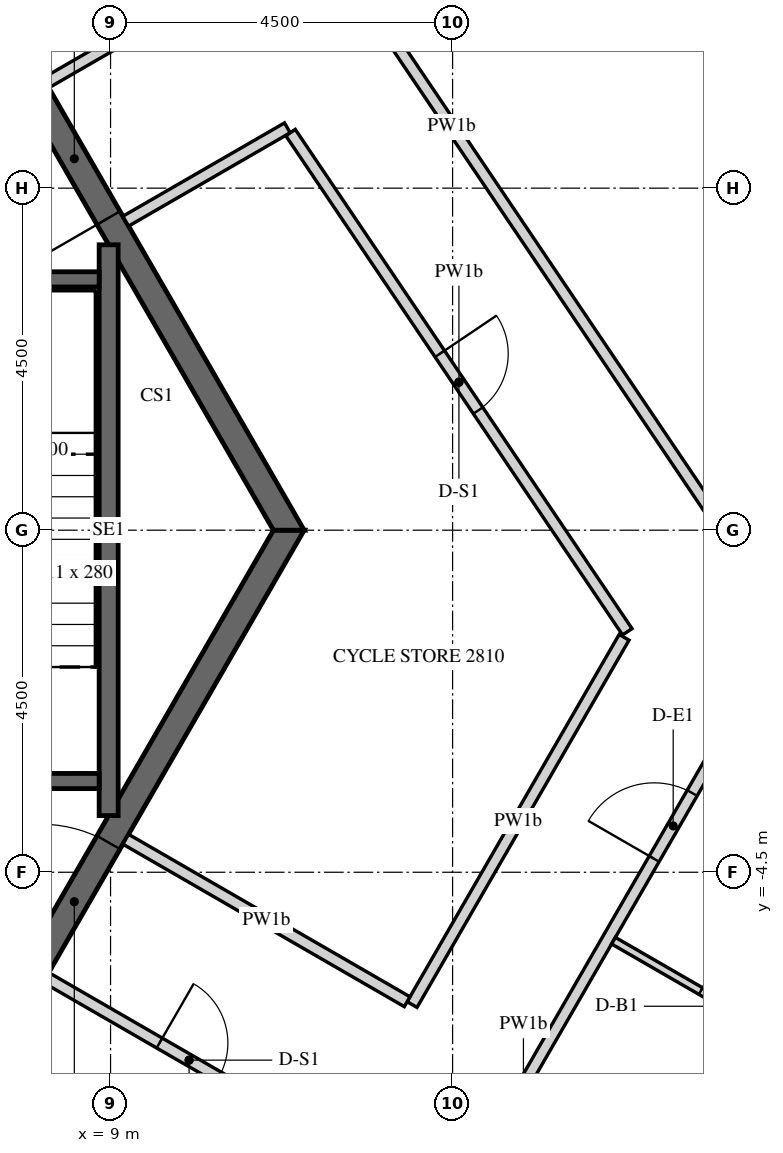
"""IFC4 building model, lengths in metres.
Left out: names, types, materials, properties, quantities, classifications, styles, units other than length and angle.
Written with IfcOpenShell. Run it as: python <this file> out.ifc"""

import sys

from ifc_helpers import new_model, si_unit, direction, frame, frame_2d, origin, place, context, subcontext, project, spatial, polyline, rectangle, outline, extrude, element, fill, save


model = new_model("IFC4")
c1 = context("Model", 3, precision=1e-05, world=origin(), true_north=direction((0.0, 1.0)))
c2 = subcontext(c1, "Body", "Model", "MODEL_VIEW")
j1 = project(units=[si_unit("LENGTHUNIT", "METRE"), si_unit("PLANEANGLEUNIT", "RADIAN")], contexts=[c1])
p1 = place(None, origin())
s1 = spatial("IfcSite", under=j1, at=p1, CompositionType="ELEMENT")
p2 = place(p1, origin())
s2 = spatial("IfcBuilding", under=s1, at=p2, CompositionType="ELEMENT")
p3 = place(p2, frame((0.0, 0.0, 361.2)))
s3 = spatial("IfcBuildingStorey", under=s2, at=p3, CompositionType="ELEMENT", Elevation=361.2)
p4 = place(p3, frame((15.273, -21.097, -0.15), z_axis=(0.0, 0.0, 1.0), x_axis=(0.499997453958, 0.866026873738, 0.0)))
e1 = element("IfcWall", 1, at=p4, inside=s3, PredefinedType="SOLIDWALL", context=c2, shape_type="SweptSolid", body=[
    extrude(outline(polyline([(-0.018, -0.225), (23.152, -0.225), (23.11, 0.225), (0.018, 0.225), (-0.018, -0.225)])), origin(), (0.0, 0.0, 1.0), 3.9),
])
p5 = place(p4, frame((1.366, 0.0, 0.45)))
e2 = element("IfcOpeningElement", 2, at=p5, cuts=e1, PredefinedType="OPENING", context=c2, shape_type="SweptSolid", body=[
    extrude(rectangle(XDim=2.4, YDim=3.0, at=frame_2d((1.2, 1.5))), frame((0.0, 0.235, 0.0), z_axis=(0.0, -1.0, 0.0), x_axis=(1.0, 0.0, 0.0)), (0.0, 0.0, 1.0), 0.47),
])
p6 = place(p4, frame((4.966, 0.0, 0.45)))
e3 = element("IfcOpeningElement", 3, at=p6, cuts=e1, PredefinedType="OPENING", context=c2, shape_type="SweptSolid", body=[
    extrude(rectangle(XDim=2.4, YDim=3.0, at=frame_2d((1.2, 1.5))), frame((0.0, 0.235, 0.0), z_axis=(0.0, -1.0, 0.0), x_axis=(1.0, 0.0, 0.0)), (0.0, 0.0, 1.0), 0.47),
])
p7 = place(p4, frame((8.566, 0.0, 0.45)))
e4 = element("IfcOpeningElement", 4, at=p7, cuts=e1, PredefinedType="OPENING", context=c2, shape_type="SweptSolid", body=[
    extrude(rectangle(XDim=2.4, YDim=3.0, at=frame_2d((1.2, 1.5))), frame((0.0, 0.235, 0.0), z_axis=(0.0, -1.0, 0.0), x_axis=(1.0, 0.0, 0.0)), (0.0, 0.0, 1.0), 0.47),
])
p8 = place(p4, frame((12.166, 0.0, 0.45)))
e5 = element("IfcOpeningElement", 5, at=p8, cuts=e1, PredefinedType="OPENING", context=c2, shape_type="SweptSolid", body=[
    extrude(rectangle(XDim=2.4, YDim=3.0, at=frame_2d((1.2, 1.5))), frame((0.0, 0.235, 0.0), z_axis=(0.0, -1.0, 0.0), x_axis=(1.0, 0.0, 0.0)), (0.0, 0.0, 1.0), 0.47),
])
p9 = place(p4, frame((15.766, 0.0, 0.45)))
e6 = element("IfcOpeningElement", 6, at=p9, cuts=e1, PredefinedType="OPENING", context=c2, shape_type="SweptSolid", body=[
    extrude(rectangle(XDim=2.4, YDim=3.0, at=frame_2d((1.2, 1.5))), frame((0.0, 0.235, 0.0), z_axis=(0.0, -1.0, 0.0), x_axis=(1.0, 0.0, 0.0)), (0.0, 0.0, 1.0), 0.47),
])
p10 = place(p4, frame((19.366, 0.0, 0.45)))
e7 = element("IfcOpeningElement", 7, at=p10, cuts=e1, PredefinedType="OPENING", context=c2, shape_type="SweptSolid", body=[
    extrude(rectangle(XDim=2.4, YDim=3.0, at=frame_2d((1.2, 1.5))), frame((0.0, 0.235, 0.0), z_axis=(0.0, -1.0, 0.0), x_axis=(1.0, 0.0, 0.0)), (0.0, 0.0, 1.0), 0.47),
])
p11 = place(p3, frame((24.37, 2.811, -0.15), z_axis=(0.0, 0.0, 1.0), x_axis=(-0.559187034749, 0.829041531027, 0.0)))
e8 = element("IfcWall", 8, at=p11, inside=s3, PredefinedType="SOLIDWALL", context=c2, shape_type="SweptSolid", body=[
    extrude(outline(polyline([(0.225, -0.225), (20.506, -0.225), (20.957, 0.225), (-0.225, 0.225), (0.225, -0.225)])), origin(), (0.0, 0.0, 1.0), 3.9),
])
p12 = place(p11, frame((0.325, 0.0, 1.05)))
e9 = element("IfcOpeningElement", 9, at=p12, cuts=e8, PredefinedType="OPENING", context=c2, shape_type="SweptSolid", body=[
    extrude(rectangle(XDim=0.9, YDim=1.5, at=frame_2d((0.45, 0.75))), frame((0.0, 0.235, 0.0), z_axis=(0.0, -1.0, 0.0), x_axis=(1.0, 0.0, 0.0)), (0.0, 0.0, 1.0), 0.47),
])
p13 = place(p11, frame((1.525, 0.0, 0.15)))
e10 = element("IfcOpeningElement", 10, at=p13, cuts=e8, PredefinedType="OPENING", context=c2, shape_type="SweptSolid", body=[
    extrude(rectangle(XDim=1.2, YDim=2.4, at=frame_2d((0.6, 1.2))), frame((0.0, 0.235, 0.0), z_axis=(0.0, -1.0, 0.0), x_axis=(1.0, 0.0, 0.0)), (0.0, 0.0, 1.0), 0.47),
])
p14 = place(p11, frame((3.766, 0.0, 1.05)))
e11 = element("IfcOpeningElement", 11, at=p14, cuts=e8, PredefinedType="OPENING", context=c2, shape_type="SweptSolid", body=[
    extrude(rectangle(XDim=0.9, YDim=1.5, at=frame_2d((0.45, 0.75))), frame((0.0, 0.235, 0.0), z_axis=(0.0, -1.0, 0.0), x_axis=(1.0, 0.0, 0.0)), (0.0, 0.0, 1.0), 0.47),
])
p15 = place(p11, frame((4.966, 0.0, 0.15)))
e12 = element("IfcOpeningElement", 12, at=p15, cuts=e8, PredefinedType="OPENING", context=c2, shape_type="SweptSolid", body=[
    extrude(rectangle(XDim=1.2, YDim=2.4, at=frame_2d((0.6, 1.2))), frame((0.0, 0.235, 0.0), z_axis=(0.0, -1.0, 0.0), x_axis=(1.0, 0.0, 0.0)), (0.0, 0.0, 1.0), 0.47),
])
p16 = place(p11, frame((7.366, 0.0, 1.05)))
e13 = element("IfcOpeningElement", 13, at=p16, cuts=e8, PredefinedType="OPENING", context=c2, shape_type="SweptSolid", body=[
    extrude(rectangle(XDim=0.9, YDim=1.5, at=frame_2d((0.45, 0.75))), frame((0.0, 0.235, 0.0), z_axis=(0.0, -1.0, 0.0), x_axis=(1.0, 0.0, 0.0)), (0.0, 0.0, 1.0), 0.47),
])
p17 = place(p11, frame((8.566, 0.0, 0.15)))
e14 = element("IfcOpeningElement", 14, at=p17, cuts=e8, PredefinedType="OPENING", context=c2, shape_type="SweptSolid", body=[
    extrude(rectangle(XDim=1.2, YDim=2.4, at=frame_2d((0.6, 1.2))), frame((0.0, 0.235, 0.0), z_axis=(0.0, -1.0, 0.0), x_axis=(1.0, 0.0, 0.0)), (0.0, 0.0, 1.0), 0.47),
])
p18 = place(p11, frame((10.966, 0.0, 1.05)))
e15 = element("IfcOpeningElement", 15, at=p18, cuts=e8, PredefinedType="OPENING", context=c2, shape_type="SweptSolid", body=[
    extrude(rectangle(XDim=0.9, YDim=1.5, at=frame_2d((0.45, 0.75))), frame((0.0, 0.235, 0.0), z_axis=(0.0, -1.0, 0.0), x_axis=(1.0, 0.0, 0.0)), (0.0, 0.0, 1.0), 0.47),
])
p19 = place(p11, frame((12.166, 0.0, 0.15)))
e16 = element("IfcOpeningElement", 16, at=p19, cuts=e8, PredefinedType="OPENING", context=c2, shape_type="SweptSolid", body=[
    extrude(rectangle(XDim=1.2, YDim=2.4, at=frame_2d((0.6, 1.2))), frame((0.0, 0.235, 0.0), z_axis=(0.0, -1.0, 0.0), x_axis=(1.0, 0.0, 0.0)), (0.0, 0.0, 1.0), 0.47),
])
p20 = place(p11, frame((14.566, 0.0, 1.05)))
e17 = element("IfcOpeningElement", 17, at=p20, cuts=e8, PredefinedType="OPENING", context=c2, shape_type="SweptSolid", body=[
    extrude(rectangle(XDim=0.9, YDim=1.5, at=frame_2d((0.45, 0.75))), frame((0.0, 0.235, 0.0), z_axis=(0.0, -1.0, 0.0), x_axis=(1.0, 0.0, 0.0)), (0.0, 0.0, 1.0), 0.47),
])
p21 = place(p11, frame((15.766, 0.0, 0.15)))
e18 = element("IfcOpeningElement", 18, at=p21, cuts=e8, PredefinedType="OPENING", context=c2, shape_type="SweptSolid", body=[
    extrude(rectangle(XDim=1.2, YDim=2.4, at=frame_2d((0.6, 1.2))), frame((0.0, 0.235, 0.0), z_axis=(0.0, -1.0, 0.0), x_axis=(1.0, 0.0, 0.0)), (0.0, 0.0, 1.0), 0.47),
])
p22 = place(p11, frame((18.007, 0.0, 1.05)))
e19 = element("IfcOpeningElement", 19, at=p22, cuts=e8, PredefinedType="OPENING", context=c2, shape_type="SweptSolid", body=[
    extrude(rectangle(XDim=0.9, YDim=1.5, at=frame_2d((0.45, 0.75))), frame((0.0, 0.235, 0.0), z_axis=(0.0, -1.0, 0.0), x_axis=(1.0, 0.0, 0.0)), (0.0, 0.0, 1.0), 0.47),
])
p23 = place(p11, frame((19.207, 0.0, 0.15)))
e20 = element("IfcOpeningElement", 20, at=p23, cuts=e8, PredefinedType="OPENING", context=c2, shape_type="SweptSolid", body=[
    extrude(rectangle(XDim=1.2, YDim=2.4, at=frame_2d((0.6, 1.2))), frame((0.0, 0.235, 0.0), z_axis=(0.0, -1.0, 0.0), x_axis=(1.0, 0.0, 0.0)), (0.0, 0.0, 1.0), 0.47),
])
p24 = place(p3, frame((5.673, -9.825, -0.15), z_axis=(0.0, 0.0, 1.0), x_axis=(0.499995046907, 0.866028263435, 0.0)))
e21 = element("IfcWall", 21, at=p24, inside=s3, PredefinedType="SHEAR", context=c2, shape_type="SweptSolid", body=[
    extrude(outline(polyline([(-0.101, -0.175), (11.446, -0.175), (11.244, 0.175), (0.101, 0.175), (-0.101, -0.175)])), origin(), (0.0, 0.0, 1.0), 3.9),
])
p25 = place(p24, frame((4.801, 0.0, 0.15)))
e22 = element("IfcOpeningElement", 22, at=p25, cuts=e21, PredefinedType="OPENING", context=c2, shape_type="SweptSolid", body=[
    extrude(rectangle(XDim=1.8, YDim=2.4, at=frame_2d((0.9, 1.2))), frame((0.0, 0.185, 0.0), z_axis=(0.0, -1.0, 0.0), x_axis=(1.0, 0.0, 0.0)), (0.0, 0.0, 1.0), 0.37),
])
p26 = place(p3, frame((11.345, 0.0, -0.15), z_axis=(0.0, 0.0, 1.0), x_axis=(-0.499995046907, 0.866028263435, 0.0)))
e23 = element("IfcWall", 23, at=p26, inside=s3, PredefinedType="SHEAR", context=c2, shape_type="SweptSolid", body=[
    extrude(outline(polyline([(-0.101, -0.175), (11.446, -0.175), (11.244, 0.175), (0.101, 0.175), (-0.101, -0.175)])), origin(), (0.0, 0.0, 1.0), 3.9),
])
p27 = place(p26, frame((4.744, 0.0, 0.15)))
e24 = element("IfcOpeningElement", 24, at=p27, cuts=e23, PredefinedType="OPENING", context=c2, shape_type="SweptSolid", body=[
    extrude(rectangle(XDim=1.8, YDim=2.4, at=frame_2d((0.9, 1.2))), frame((0.0, 0.185, 0.0), z_axis=(0.0, -1.0, 0.0), x_axis=(1.0, 0.0, 0.0)), (0.0, 0.0, 1.0), 0.37),
])
p28 = place(p3, frame((8.975, -3.755, -0.25), z_axis=(0.0, 0.0, 1.0), x_axis=(0.0, 1.0, 0.0)))
e25 = element("IfcWall", 25, at=p28, inside=s3, PredefinedType="SHEAR", context=c2, shape_type="SweptSolid", body=[
    extrude(rectangle(XDim=7.51, YDim=0.25, at=frame_2d((3.755, 0.0))), origin(), (0.0, 0.0, 1.0), 3.9),
])
p29 = place(p3, frame((5.9, 3.3, -0.25), z_axis=(0.0, 0.0, 1.0), x_axis=(1.0, 0.0, 0.0)))
e26 = element("IfcWall", 26, at=p29, inside=s3, PredefinedType="SHEAR", context=c2, shape_type="SweptSolid", body=[
    extrude(rectangle(XDim=2.95, YDim=0.2, at=frame_2d((1.475, 0.0))), origin(), (0.0, 0.0, 1.0), 3.9),
])
p30 = place(p3, frame((5.9, -3.3, -0.25), z_axis=(0.0, 0.0, 1.0), x_axis=(1.0, 0.0, 0.0)))
e27 = element("IfcWall", 27, at=p30, inside=s3, PredefinedType="SHEAR", context=c2, shape_type="SweptSolid", body=[
    extrude(rectangle(XDim=2.95, YDim=0.2, at=frame_2d((1.475, 0.0))), origin(), (0.0, 0.0, 1.0), 3.9),
])
p31 = place(p30, frame((0.875, 0.0, 0.25)))
e28 = element("IfcOpeningElement", 28, at=p31, cuts=e27, PredefinedType="OPENING", context=c2, shape_type="SweptSolid", body=[
    extrude(rectangle(XDim=1.2, YDim=2.4, at=frame_2d((0.6, 1.2))), frame((0.0, 0.11, 0.0), z_axis=(0.0, -1.0, 0.0), x_axis=(1.0, 0.0, 0.0)), (0.0, 0.0, 1.0), 0.22),
])
p32 = place(p3, frame((10.944, -13.344, 0.0), z_axis=(0.0, 0.0, 1.0), x_axis=(0.500003210163, 0.866023550388, 0.0)))
e29 = element("IfcWall", 29, at=p32, inside=s3, PredefinedType="PARTITIONING", context=c2, shape_type="SweptSolid", body=[
    extrude(rectangle(XDim=13.951, YDim=0.15, at=frame_2d((6.975, 0.0))), origin(), (0.0, 0.0, 1.0), 2.82),
])
p33 = place(p32, frame((1.116, 0.0, 0.0)))
e30 = element("IfcOpeningElement", 30, at=p33, cuts=e29, PredefinedType="OPENING", context=c2, shape_type="SweptSolid", body=[
    extrude(rectangle(XDim=1.0, YDim=2.1, at=frame_2d((0.5, 1.05))), frame((0.0, 0.085, 0.0), z_axis=(0.0, -1.0, 0.0), x_axis=(1.0, 0.0, 0.0)), (0.0, 0.0, 1.0), 0.17),
])
p34 = place(p32, frame((10.416, 0.0, 0.0)))
e31 = element("IfcOpeningElement", 31, at=p34, cuts=e29, PredefinedType="OPENING", context=c2, shape_type="SweptSolid", body=[
    extrude(rectangle(XDim=1.0, YDim=2.1, at=frame_2d((0.5, 1.05))), frame((0.0, 0.085, 0.0), z_axis=(0.0, -1.0, 0.0), x_axis=(1.0, 0.0, 0.0)), (0.0, 0.0, 1.0), 0.17),
])
p35 = place(p3, frame((17.873, -1.193, 0.0), z_axis=(0.0, 0.0, 1.0), x_axis=(-0.559188435605, 0.829040586151, 0.0)))
e32 = element("IfcWall", 32, at=p35, inside=s3, PredefinedType="PARTITIONING", context=c2, shape_type="SweptSolid", body=[
    extrude(rectangle(XDim=15.688, YDim=0.15, at=frame_2d((7.844, 0.0))), origin(), (0.0, 0.0, 1.0), 2.82),
])
p36 = place(p3, frame((9.2, 4.066, 0.0), z_axis=(0.0, 0.0, 1.0), x_axis=(0.866038240688, 0.499977765172, 0.0)))
e33 = element("IfcWall", 33, at=p36, inside=s3, PredefinedType="PARTITIONING", context=c2, shape_type="SweptSolid", body=[
    extrude(rectangle(XDim=2.456, YDim=0.15, at=frame_2d((1.228, 0.0))), origin(), (0.0, 0.0, 1.0), 2.82),
])
p37 = place(p3, frame((11.368, 5.231, 0.0), z_axis=(0.0, 0.0, 1.0), x_axis=(0.55919388604, -0.829036909803, 0.0)))
e34 = element("IfcWall", 34, at=p37, inside=s3, PredefinedType="PARTITIONING", context=c2, shape_type="SweptSolid", body=[
    extrude(rectangle(XDim=7.922, YDim=0.15, at=frame_2d((3.961, 0.0))), origin(), (0.0, 0.0, 1.0), 2.82),
])
p38 = place(p37, frame((3.511, 0.0, 0.0)))
e35 = element("IfcOpeningElement", 35, at=p38, cuts=e34, PredefinedType="OPENING", context=c2, shape_type="SweptSolid", body=[
    extrude(rectangle(XDim=0.9, YDim=2.1, at=frame_2d((0.45, 1.05))), frame((0.0, 0.085, 0.0), z_axis=(0.0, -1.0, 0.0), x_axis=(1.0, 0.0, 0.0)), (0.0, 0.0, 1.0), 0.17),
])
p39 = place(p3, frame((15.757, -1.409, 0.0), z_axis=(0.0, 0.0, 1.0), x_axis=(-0.500002739321, -0.866023822231, 0.0)))
e36 = element("IfcWall", 36, at=p39, inside=s3, PredefinedType="PARTITIONING", context=c2, shape_type="SweptSolid", body=[
    extrude(rectangle(XDim=5.58, YDim=0.15, at=frame_2d((2.79, 0.0))), origin(), (0.0, 0.0, 1.0), 2.82),
])
p40 = place(p3, frame((12.902, -6.203, 0.0), z_axis=(0.0, 0.0, 1.0), x_axis=(-0.866023907196, 0.500002592159, 0.0)))
e37 = element("IfcWall", 37, at=p40, inside=s3, PredefinedType="PARTITIONING", context=c2, shape_type="SweptSolid", body=[
    extrude(rectangle(XDim=4.275, YDim=0.15, at=frame_2d((2.137, 0.0))), origin(), (0.0, 0.0, 1.0), 2.82),
])
p41 = place(p3, frame((8.15, -5.884, 0.0), z_axis=(0.0, 0.0, 1.0), x_axis=(0.866027639635, -0.499996127374, 0.0)))
e38 = element("IfcWall", 38, at=p41, inside=s3, PredefinedType="PARTITIONING", context=c2, shape_type="SweptSolid", body=[
    extrude(rectangle(XDim=4.35, YDim=0.15, at=frame_2d((2.175, 0.0))), origin(), (0.0, 0.0, 1.0), 2.82),
])
p42 = place(p41, frame((1.725, 0.0, 0.0)))
e39 = element("IfcOpeningElement", 39, at=p42, cuts=e38, PredefinedType="OPENING", context=c2, shape_type="SweptSolid", body=[
    extrude(rectangle(XDim=0.9, YDim=2.1, at=frame_2d((0.45, 1.05))), frame((0.0, 0.085, 0.0), z_axis=(0.0, -1.0, 0.0), x_axis=(1.0, 0.0, 0.0)), (0.0, 0.0, 1.0), 0.17),
])
p43 = place(p3, frame((10.084, 7.001, 0.0), z_axis=(0.0, 0.0, 1.0), x_axis=(-0.865994457699, -0.500053596362, 0.0)))
e40 = element("IfcWall", 40, at=p43, inside=s3, PredefinedType="PARTITIONING", context=c2, shape_type="SweptSolid", body=[
    extrude(rectangle(XDim=2.234, YDim=0.15, at=frame_2d((1.117, 0.0))), origin(), (0.0, 0.0, 1.0), 2.82),
])
p44 = place(p3, frame((15.617, -5.4, 0.0), z_axis=(0.0, 0.0, 1.0), x_axis=(0.866031034943, -0.499990246421, 0.0)))
e41 = element("IfcWall", 41, at=p44, inside=s3, PredefinedType="PARTITIONING", context=c2, shape_type="SweptSolid", body=[
    extrude(rectangle(XDim=3.525, YDim=0.1, at=frame_2d((1.762, 0.0))), origin(), (0.0, 0.0, 1.0), 2.82),
])
p45 = place(p44, frame((1.325, 0.0, 0.0)))
e42 = element("IfcOpeningElement", 42, at=p45, cuts=e41, PredefinedType="OPENING", context=c2, shape_type="SweptSolid", body=[
    extrude(rectangle(XDim=0.8, YDim=2.1, at=frame_2d((0.4, 1.05))), frame((0.0, 0.06, 0.0), z_axis=(0.0, -1.0, 0.0), x_axis=(1.0, 0.0, 0.0)), (0.0, 0.0, 1.0), 0.12),
])
p46 = place(p27, origin())
e43 = element("IfcDoor", 43, at=p46, inside=s3, OperationType="DOUBLE_DOOR_SINGLE_SWING", PredefinedType="DOOR", context=c2, shape_type="SweptSolid", body=[
    extrude(rectangle(XDim=1.8, YDim=2.4, at=frame_2d((0.9, 1.2))), frame((0.0, 0.025, 0.0), z_axis=(0.0, -1.0, 0.0), x_axis=(1.0, 0.0, 0.0)), (0.0, 0.0, 1.0), 0.05),
])
fill(e24, e43)
p47 = place(p25, origin())
e44 = element("IfcDoor", 44, at=p47, inside=s3, OperationType="DOUBLE_DOOR_SINGLE_SWING", PredefinedType="DOOR", context=c2, shape_type="SweptSolid", body=[
    extrude(rectangle(XDim=1.8, YDim=2.4, at=frame_2d((0.9, 1.2))), frame((0.0, 0.025, 0.0), z_axis=(0.0, -1.0, 0.0), x_axis=(1.0, 0.0, 0.0)), (0.0, 0.0, 1.0), 0.05),
])
fill(e22, e44)
p48 = place(p34, origin())
e45 = element("IfcDoor", 45, at=p48, inside=s3, OperationType="SINGLE_SWING_RIGHT", PredefinedType="DOOR", context=c2, shape_type="SweptSolid", body=[
    extrude(rectangle(XDim=1.0, YDim=2.1, at=frame_2d((0.5, 1.05))), frame((0.0, 0.025, 0.0), z_axis=(0.0, -1.0, 0.0), x_axis=(1.0, 0.0, 0.0)), (0.0, 0.0, 1.0), 0.05),
])
fill(e31, e45)
p49 = place(p45, origin())
e46 = element("IfcDoor", 46, at=p49, inside=s3, OperationType="SINGLE_SWING_RIGHT", PredefinedType="DOOR", context=c2, shape_type="SweptSolid", body=[
    extrude(rectangle(XDim=0.8, YDim=2.1, at=frame_2d((0.4, 1.05))), frame((0.0, 0.025, 0.0), z_axis=(0.0, -1.0, 0.0), x_axis=(1.0, 0.0, 0.0)), (0.0, 0.0, 1.0), 0.05),
])
fill(e42, e46)
p50 = place(p38, origin())
e47 = element("IfcDoor", 47, at=p50, inside=s3, OperationType="SINGLE_SWING_RIGHT", PredefinedType="DOOR", context=c2, shape_type="SweptSolid", body=[
    extrude(rectangle(XDim=0.9, YDim=2.1, at=frame_2d((0.45, 1.05))), frame((0.0, 0.025, 0.0), z_axis=(0.0, -1.0, 0.0), x_axis=(1.0, 0.0, 0.0)), (0.0, 0.0, 1.0), 0.05),
])
fill(e35, e47)
p51 = place(p42, origin())
e48 = element("IfcDoor", 48, at=p51, inside=s3, OperationType="SINGLE_SWING_LEFT", PredefinedType="DOOR", context=c2, shape_type="SweptSolid", body=[
    extrude(rectangle(XDim=0.9, YDim=2.1, at=frame_2d((0.45, 1.05))), frame((0.0, 0.025, 0.0), z_axis=(0.0, -1.0, 0.0), x_axis=(1.0, 0.0, 0.0)), (0.0, 0.0, 1.0), 0.05),
])
fill(e39, e48)
save(model, sys.argv[1])
